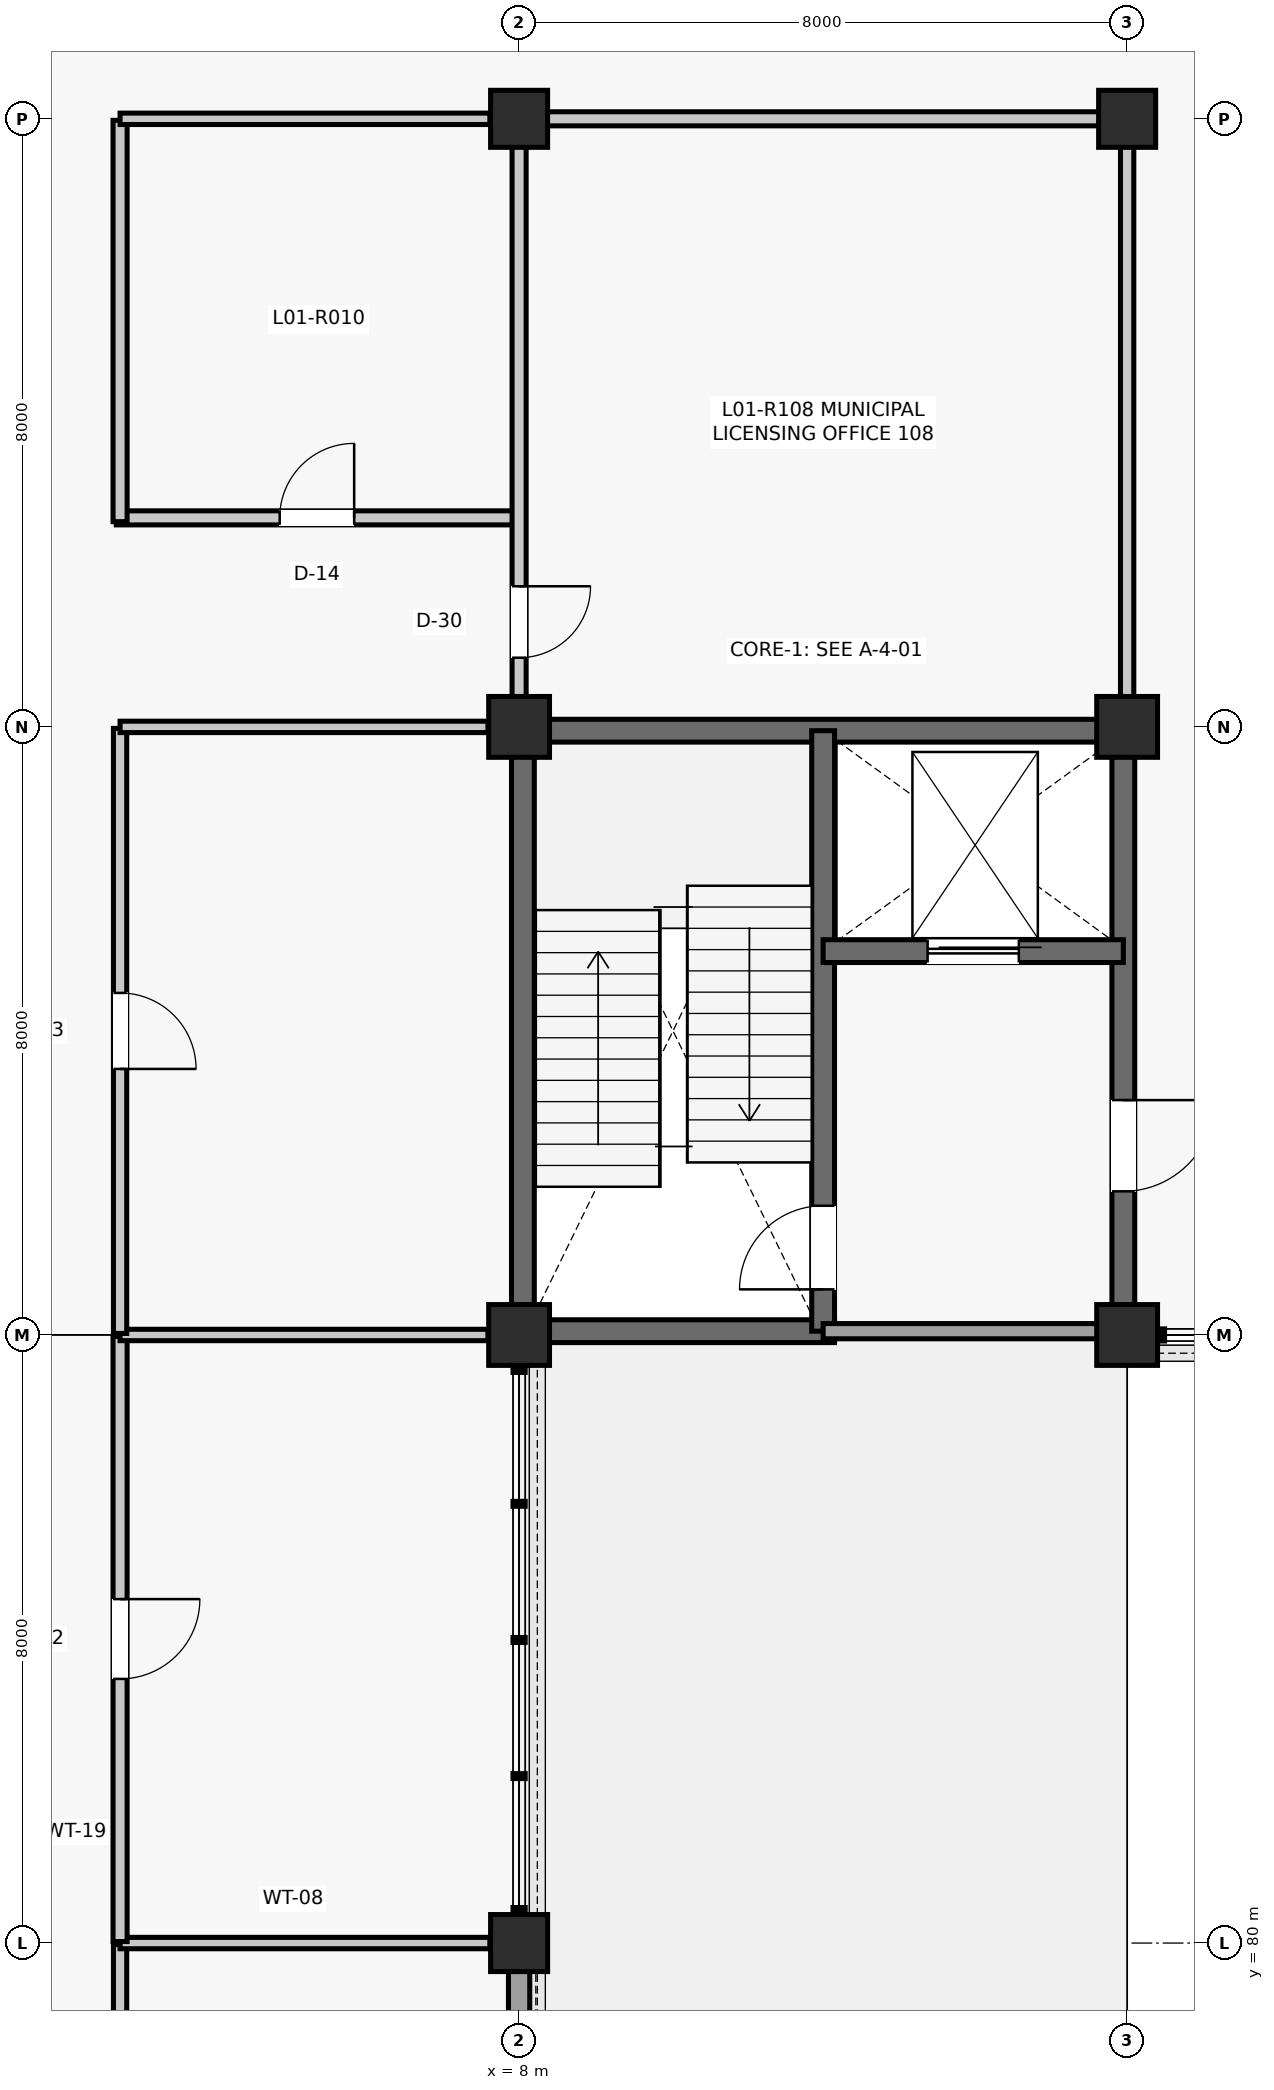
"""IFC4 building model, lengths in metres.
Left out: names, types, materials, properties, quantities, classifications, styles, units other than length and angle.
Written with IfcOpenShell. Run it as: python <this file> out.ifc"""

import sys

from ifc_helpers import new_model, si_unit, direction, frame, frame_2d, origin, origin_2d, place, context, subcontext, project, spatial, rectangle, extrude, element, fill, save


model = new_model("IFC4")
c1 = context("Model", 3, precision=1e-05, world=origin(), true_north=direction((0.0, 1.0)))
c2 = subcontext(c1, "Body", "Model", "MODEL_VIEW")
j1 = project(units=[si_unit("LENGTHUNIT", "METRE"), si_unit("PLANEANGLEUNIT", "RADIAN")], contexts=[c1])
p1 = place(None, origin())
s1 = spatial("IfcSite", under=j1, at=p1, CompositionType="ELEMENT")
p2 = place(p1, origin())
s2 = spatial("IfcBuilding", under=s1, at=p2, CompositionType="ELEMENT")
p3 = place(p2, frame((0.0, 0.0, 5.28)))
s3 = spatial("IfcBuildingStorey", under=s2, at=p3, CompositionType="ELEMENT", Elevation=5.28)
p4 = place(p3, frame((8.0, 80.0, 0.0), z_axis=(0.0, 0.0, 1.0), x_axis=(1.0, 0.0, 0.0)))
e1 = element("IfcColumn", 1, at=p4, inside=s3, PredefinedType="COLUMN", context=c2, shape_type="SweptSolid", body=[
    extrude(rectangle(XDim=0.75, YDim=0.75, at=origin_2d()), origin(), (0.0, 0.0, 1.0), 4.62),
])
for number, where, z_axis, x_axis in (
    (2, (8.0, 88.0, 0.0), (0.0, 0.0, 1.0), (1.0, 0.0, 0.0)),
    (3, (8.0, 96.0, 0.0), (0.0, 0.0, 1.0), (1.0, 0.0, 0.0)),
):
    element("IfcColumn", number, at=place(p3, frame(where, z_axis=z_axis, x_axis=x_axis)), inside=s3, PredefinedType="COLUMN", context=c2, shape_type="SweptSolid", body=[
        extrude(rectangle(XDim=0.8, YDim=0.8, at=origin_2d()), origin(), (0.0, 0.0, 1.0), 4.62),
    ])
p5 = place(p3, frame((8.0, 104.0, 0.0), z_axis=(0.0, 0.0, 1.0), x_axis=(1.0, 0.0, 0.0)))
e4 = element("IfcColumn", 4, at=p5, inside=s3, PredefinedType="COLUMN", context=c2, shape_type="SweptSolid", body=[
    extrude(rectangle(XDim=0.75, YDim=0.75, at=origin_2d()), origin(), (0.0, 0.0, 1.0), 4.62),
])
for number, where, z_axis, x_axis in (
    (5, (16.0, 88.0, 0.0), (0.0, 0.0, 1.0), (1.0, 0.0, 0.0)),
    (6, (16.0, 96.0, 0.0), (0.0, 0.0, 1.0), (1.0, 0.0, 0.0)),
):
    element("IfcColumn", number, at=place(p3, frame(where, z_axis=z_axis, x_axis=x_axis)), inside=s3, PredefinedType="COLUMN", context=c2, shape_type="SweptSolid", body=[
        extrude(rectangle(XDim=0.8, YDim=0.8, at=origin_2d()), origin(), (0.0, 0.0, 1.0), 4.62),
    ])
p6 = place(p3, frame((16.0, 104.0, 0.0), z_axis=(0.0, 0.0, 1.0), x_axis=(1.0, 0.0, 0.0)))
e7 = element("IfcColumn", 7, at=p6, inside=s3, PredefinedType="COLUMN", context=c2, shape_type="SweptSolid", body=[
    extrude(rectangle(XDim=0.75, YDim=0.75, at=origin_2d()), origin(), (0.0, 0.0, 1.0), 4.62),
])
p7 = place(p3, frame((8.0, 72.285, 0.0), z_axis=(0.0, 0.0, 1.0), x_axis=(0.0, 1.0, 0.0)))
e8 = element("IfcWall", 8, at=p7, inside=s3, PredefinedType="SOLIDWALL", context=c2, shape_type="SweptSolid", body=[
    extrude(rectangle(XDim=7.355, YDim=0.28, at=frame_2d((3.677, 0.0))), origin(), (0.0, 0.0, 1.0), 3.977),
])
p8 = place(p7, frame((2.627, 0.0, 0.9)))
e9 = element("IfcOpeningElement", 9, at=p8, cuts=e8, PredefinedType="OPENING", context=c2, shape_type="SweptSolid", body=[
    extrude(rectangle(XDim=2.1, YDim=2.4, at=frame_2d((1.05, 1.2))), frame((0.0, 0.15, 0.0), z_axis=(0.0, -1.0, 0.0), x_axis=(1.0, 0.0, 0.0)), (0.0, 0.0, 1.0), 0.3),
])
for number, where, z_axis, x_axis in (
    (10, (8.05, 88.29, 0.0), (0.0, 0.0, 1.0), (0.0, 1.0, 0.0)),
    (11, (8.29, 95.95, 0.0), (0.0, 0.0, 1.0), (1.0, 0.0, 0.0)),
):
    element("IfcWall", number, at=place(p3, frame(where, z_axis=z_axis, x_axis=x_axis)), inside=s3, PredefinedType="SHEAR", context=c2, shape_type="SweptSolid", body=[
        extrude(rectangle(XDim=7.42, YDim=0.3, at=frame_2d((3.71, 0.0))), origin(), (0.0, 0.0, 1.0), 4.335),
    ])
p9 = place(p3, frame((15.95, 88.29, 0.0), z_axis=(0.0, 0.0, 1.0), x_axis=(0.0, 1.0, 0.0)))
e12 = element("IfcWall", 12, at=p9, inside=s3, PredefinedType="SHEAR", context=c2, shape_type="SweptSolid", body=[
    extrude(rectangle(XDim=7.42, YDim=0.3, at=frame_2d((3.71, 0.0))), origin(), (0.0, 0.0, 1.0), 4.335),
])
p10 = place(p9, frame((1.6, 0.0, 0.0)))
e13 = element("IfcOpeningElement", 13, at=p10, cuts=e12, PredefinedType="OPENING", context=c2, shape_type="SweptSolid", body=[
    extrude(rectangle(XDim=1.2, YDim=2.15, at=frame_2d((0.6, 1.075))), frame((0.0, 0.16, 0.0), z_axis=(0.0, -1.0, 0.0), x_axis=(1.0, 0.0, 0.0)), (0.0, 0.0, 1.0), 0.32),
])
p11 = place(p3, frame((8.29, 88.05, 0.0), z_axis=(0.0, 0.0, 1.0), x_axis=(1.0, 0.0, 0.0)))
e14 = element("IfcWall", 14, at=p11, inside=s3, PredefinedType="SHEAR", context=c2, shape_type="SweptSolid", body=[
    extrude(rectangle(XDim=3.86, YDim=0.3, at=frame_2d((1.93, 0.0))), origin(), (0.0, 0.0, 1.0), 4.335),
])
p12 = place(p3, frame((12.0, 88.05, 0.0), z_axis=(0.0, 0.0, 1.0), x_axis=(0.0, 1.0, 0.0)))
e15 = element("IfcWall", 15, at=p12, inside=s3, PredefinedType="SHEAR", context=c2, shape_type="SweptSolid", body=[
    extrude(rectangle(XDim=7.9, YDim=0.3, at=frame_2d((3.95, 0.0))), origin(), (0.0, 0.0, 1.0), 4.335),
])
p13 = place(p12, frame((0.55, 0.0, 0.0)))
e16 = element("IfcOpeningElement", 16, at=p13, cuts=e15, PredefinedType="OPENING", context=c2, shape_type="SweptSolid", body=[
    extrude(rectangle(XDim=1.1, YDim=2.15, at=frame_2d((0.55, 1.075))), frame((0.0, 0.16, 0.0), z_axis=(0.0, -1.0, 0.0), x_axis=(1.0, 0.0, 0.0)), (0.0, 0.0, 1.0), 0.32),
])
p14 = place(p3, frame((12.0, 93.05, 0.0), z_axis=(0.0, 0.0, 1.0), x_axis=(1.0, 0.0, 0.0)))
e17 = element("IfcWall", 17, at=p14, inside=s3, PredefinedType="SHEAR", context=c2, shape_type="SweptSolid", body=[
    extrude(rectangle(XDim=3.95, YDim=0.3, at=frame_2d((1.975, 0.0))), origin(), (0.0, 0.0, 1.0), 4.335),
])
p15 = place(p14, frame((1.375, 0.0, 0.0)))
e18 = element("IfcOpeningElement", 18, at=p15, cuts=e17, PredefinedType="OPENING", context=c2, shape_type="SweptSolid", body=[
    extrude(rectangle(XDim=1.2, YDim=2.2, at=frame_2d((0.6, 1.1))), frame((0.0, 0.16, 0.0), z_axis=(0.0, -1.0, 0.0), x_axis=(1.0, 0.0, 0.0)), (0.0, 0.0, 1.0), 0.32),
])
p16 = place(p3, frame((12.0, 88.05, 0.0), z_axis=(0.0, 0.0, 1.0), x_axis=(1.0, 0.0, 0.0)))
e19 = element("IfcWall", 19, at=p16, inside=s3, PredefinedType="PARTITIONING", context=c2, shape_type="SweptSolid", body=[
    extrude(rectangle(XDim=3.61, YDim=0.2, at=frame_2d((1.805, 0.0))), origin(), (0.0, 0.0, 1.0), 3.967),
])
p17 = place(p3, frame((2.75, 72.02, 0.0), z_axis=(0.0, 0.0, 1.0), x_axis=(0.0, 1.0, 0.0)))
e20 = element("IfcWall", 20, at=p17, inside=s3, PredefinedType="PARTITIONING", context=c2, shape_type="SweptSolid", body=[
    extrude(rectangle(XDim=7.96, YDim=0.175, at=frame_2d((3.98, 0.0))), origin(), (0.0, 0.0, 1.0), 3.771),
])
p18 = place(p17, frame((3.51, 0.0, 0.0)))
e21 = element("IfcOpeningElement", 21, at=p18, cuts=e20, PredefinedType="OPENING", context=c2, shape_type="SweptSolid", body=[
    extrude(rectangle(XDim=0.94, YDim=2.12, at=frame_2d((0.47, 1.06))), frame((0.0, 0.097, 0.0), z_axis=(0.0, -1.0, 0.0), x_axis=(1.0, 0.0, 0.0)), (0.0, 0.0, 1.0), 0.195),
])
p19 = place(p3, frame((2.75, 80.0, 0.0), z_axis=(0.0, 0.0, 1.0), x_axis=(1.0, 0.0, 0.0)))
e22 = element("IfcWall", 22, at=p19, inside=s3, PredefinedType="PARTITIONING", context=c2, shape_type="SweptSolid", body=[
    extrude(rectangle(XDim=4.865, YDim=0.15, at=frame_2d((2.433, 0.0))), origin(), (0.0, 0.0, 1.0), 3.771),
])
p20 = place(p3, frame((2.75, 80.02, 0.0), z_axis=(0.0, 0.0, 1.0), x_axis=(0.0, 1.0, 0.0)))
e23 = element("IfcWall", 23, at=p20, inside=s3, PredefinedType="PARTITIONING", context=c2, shape_type="SweptSolid", body=[
    extrude(rectangle(XDim=7.96, YDim=0.185, at=frame_2d((3.98, 0.0))), origin(), (0.0, 0.0, 1.0), 3.771),
])
p21 = place(p20, frame((3.455, 0.0, 0.0)))
e24 = element("IfcOpeningElement", 24, at=p21, cuts=e23, PredefinedType="OPENING", context=c2, shape_type="SweptSolid", body=[
    extrude(rectangle(XDim=1.05, YDim=2.15, at=frame_2d((0.525, 1.075))), frame((0.0, 0.103, 0.0), z_axis=(0.0, -1.0, 0.0), x_axis=(1.0, 0.0, 0.0)), (0.0, 0.0, 1.0), 0.205),
])
p22 = place(p3, frame((2.75, 88.0, 0.0), z_axis=(0.0, 0.0, 1.0), x_axis=(1.0, 0.0, 0.0)))
e25 = element("IfcWall", 25, at=p22, inside=s3, PredefinedType="PARTITIONING", context=c2, shape_type="SweptSolid", body=[
    extrude(rectangle(XDim=4.84, YDim=0.15, at=frame_2d((2.42, 0.0))), origin(), (0.0, 0.0, 1.0), 3.781),
])
p23 = place(p3, frame((2.75, 88.02, 0.0), z_axis=(0.0, 0.0, 1.0), x_axis=(0.0, 1.0, 0.0)))
e26 = element("IfcWall", 26, at=p23, inside=s3, PredefinedType="PARTITIONING", context=c2, shape_type="SweptSolid", body=[
    extrude(rectangle(XDim=7.96, YDim=0.175, at=frame_2d((3.98, 0.0))), origin(), (0.0, 0.0, 1.0), 3.712),
])
p24 = place(p23, frame((3.48, 0.0, 0.0)))
e27 = element("IfcOpeningElement", 27, at=p24, cuts=e26, PredefinedType="OPENING", context=c2, shape_type="SweptSolid", body=[
    extrude(rectangle(XDim=1.0, YDim=2.15, at=frame_2d((0.5, 1.075))), frame((0.0, 0.097, 0.0), z_axis=(0.0, -1.0, 0.0), x_axis=(1.0, 0.0, 0.0)), (0.0, 0.0, 1.0), 0.195),
])
p25 = place(p3, frame((2.75, 96.0, 0.0), z_axis=(0.0, 0.0, 1.0), x_axis=(1.0, 0.0, 0.0)))
e28 = element("IfcWall", 28, at=p25, inside=s3, PredefinedType="PARTITIONING", context=c2, shape_type="SweptSolid", body=[
    extrude(rectangle(XDim=4.84, YDim=0.15, at=frame_2d((2.42, 0.0))), origin(), (0.0, 0.0, 1.0), 3.712),
])
p26 = place(p3, frame((2.7, 98.75, 0.0), z_axis=(0.0, 0.0, 1.0), x_axis=(1.0, 0.0, 0.0)))
e29 = element("IfcWall", 29, at=p26, inside=s3, PredefinedType="PARTITIONING", context=c2, shape_type="SweptSolid", body=[
    extrude(rectangle(XDim=5.28, YDim=0.185, at=frame_2d((2.64, 0.0))), origin(), (0.0, 0.0, 1.0), 3.857),
])
p27 = place(p26, frame((2.15, 0.0, 0.0)))
e30 = element("IfcOpeningElement", 30, at=p27, cuts=e29, PredefinedType="OPENING", context=c2, shape_type="SweptSolid", body=[
    extrude(rectangle(XDim=0.98, YDim=2.15, at=frame_2d((0.49, 1.075))), frame((0.0, 0.103, 0.0), z_axis=(0.0, -1.0, 0.0), x_axis=(1.0, 0.0, 0.0)), (0.0, 0.0, 1.0), 0.205),
])
p28 = place(p3, frame((2.75, 98.7, 0.0), z_axis=(0.0, 0.0, 1.0), x_axis=(0.0, 1.0, 0.0)))
e31 = element("IfcWall", 31, at=p28, inside=s3, PredefinedType="PARTITIONING", context=c2, shape_type="SweptSolid", body=[
    extrude(rectangle(XDim=5.28, YDim=0.185, at=frame_2d((2.64, 0.0))), origin(), (0.0, 0.0, 1.0), 3.787),
])
p29 = place(p3, frame((2.75, 104.0, 0.0), z_axis=(0.0, 0.0, 1.0), x_axis=(1.0, 0.0, 0.0)))
e32 = element("IfcWall", 32, at=p29, inside=s3, PredefinedType="PARTITIONING", context=c2, shape_type="SweptSolid", body=[
    extrude(rectangle(XDim=4.865, YDim=0.15, at=frame_2d((2.433, 0.0))), origin(), (0.0, 0.0, 1.0), 3.787),
])
p30 = place(p3, frame((8.0, 96.39, 0.0), z_axis=(0.0, 0.0, 1.0), x_axis=(0.0, 1.0, 0.0)))
e33 = element("IfcWall", 33, at=p30, inside=s3, PredefinedType="PARTITIONING", context=c2, shape_type="SweptSolid", body=[
    extrude(rectangle(XDim=7.245, YDim=0.185, at=frame_2d((3.623, 0.0))), origin(), (0.0, 0.0, 1.0), 3.857),
])
p31 = place(p30, frame((0.52, 0.0, 0.0)))
e34 = element("IfcOpeningElement", 34, at=p31, cuts=e33, PredefinedType="OPENING", context=c2, shape_type="SweptSolid", body=[
    extrude(rectangle(XDim=0.94, YDim=2.12, at=frame_2d((0.47, 1.06))), frame((0.0, 0.103, 0.0), z_axis=(0.0, -1.0, 0.0), x_axis=(1.0, 0.0, 0.0)), (0.0, 0.0, 1.0), 0.205),
])
p32 = place(p3, frame((16.0, 96.39, 0.0), z_axis=(0.0, 0.0, 1.0), x_axis=(0.0, 1.0, 0.0)))
e35 = element("IfcWall", 35, at=p32, inside=s3, PredefinedType="PARTITIONING", context=c2, shape_type="SweptSolid", body=[
    extrude(rectangle(XDim=7.245, YDim=0.175, at=frame_2d((3.623, 0.0))), origin(), (0.0, 0.0, 1.0), 3.781),
])
p33 = place(p3, frame((8.365, 104.0, 0.0), z_axis=(0.0, 0.0, 1.0), x_axis=(1.0, 0.0, 0.0)))
e36 = element("IfcWall", 36, at=p33, inside=s3, PredefinedType="PARTITIONING", context=c2, shape_type="SweptSolid", body=[
    extrude(rectangle(XDim=7.27, YDim=0.185, at=frame_2d((3.635, 0.0))), origin(), (0.0, 0.0, 1.0), 3.771),
])
p34 = place(p13, origin())
e37 = element("IfcDoor", 37, at=p34, inside=s3, OperationType="SINGLE_SWING_LEFT", PredefinedType="DOOR", context=c2, shape_type="SweptSolid", body=[
    extrude(rectangle(XDim=1.1, YDim=2.15, at=frame_2d((0.55, 1.075))), frame((0.0, 0.025, 0.0), z_axis=(0.0, -1.0, 0.0), x_axis=(1.0, 0.0, 0.0)), (0.0, 0.0, 1.0), 0.05),
])
fill(e16, e37)
p35 = place(p15, origin())
e38 = element("IfcDoor", 38, at=p35, inside=s3, OperationType="SLIDING_TO_LEFT", PredefinedType="DOOR", context=c2, shape_type="SweptSolid", body=[
    extrude(rectangle(XDim=1.2, YDim=2.2, at=frame_2d((0.6, 1.1))), frame((0.0, 0.025, 0.0), z_axis=(0.0, -1.0, 0.0), x_axis=(1.0, 0.0, 0.0)), (0.0, 0.0, 1.0), 0.05),
])
fill(e18, e38)
p36 = place(p10, frame((1.2, 0.0, 0.0), z_axis=(0.0, 0.0, 1.0), x_axis=(-1.0, 0.0, 0.0)))
e39 = element("IfcDoor", 39, at=p36, inside=s3, OperationType="SINGLE_SWING_RIGHT", PredefinedType="DOOR", context=c2, shape_type="SweptSolid", body=[
    extrude(rectangle(XDim=1.2, YDim=2.15, at=frame_2d((0.6, 1.075))), frame((0.0, 0.025, 0.0), z_axis=(0.0, -1.0, 0.0), x_axis=(1.0, 0.0, 0.0)), (0.0, 0.0, 1.0), 0.05),
])
fill(e13, e39)
p37 = place(p21, frame((1.05, 0.0, 0.0), z_axis=(0.0, 0.0, 1.0), x_axis=(-1.0, 0.0, 0.0)))
e40 = element("IfcDoor", 40, at=p37, inside=s3, OperationType="SINGLE_SWING_RIGHT", PredefinedType="DOOR", context=c2, shape_type="SweptSolid", body=[
    extrude(rectangle(XDim=1.05, YDim=2.15, at=frame_2d((0.525, 1.075))), frame((0.0, 0.025, 0.0), z_axis=(0.0, -1.0, 0.0), x_axis=(1.0, 0.0, 0.0)), (0.0, 0.0, 1.0), 0.05),
])
fill(e24, e40)
p38 = place(p24, frame((1.0, 0.0, 0.0), z_axis=(0.0, 0.0, 1.0), x_axis=(-1.0, 0.0, 0.0)))
e41 = element("IfcDoor", 41, at=p38, inside=s3, OperationType="SINGLE_SWING_LEFT", PredefinedType="DOOR", context=c2, shape_type="SweptSolid", body=[
    extrude(rectangle(XDim=1.0, YDim=2.15, at=frame_2d((0.5, 1.075))), frame((0.0, 0.025, 0.0), z_axis=(0.0, -1.0, 0.0), x_axis=(1.0, 0.0, 0.0)), (0.0, 0.0, 1.0), 0.05),
])
fill(e27, e41)
p39 = place(p27, origin())
e42 = element("IfcDoor", 42, at=p39, inside=s3, OperationType="SINGLE_SWING_RIGHT", PredefinedType="DOOR", context=c2, shape_type="SweptSolid", body=[
    extrude(rectangle(XDim=0.98, YDim=2.15, at=frame_2d((0.49, 1.075))), frame((0.0, 0.025, 0.0), z_axis=(0.0, -1.0, 0.0), x_axis=(1.0, 0.0, 0.0)), (0.0, 0.0, 1.0), 0.05),
])
fill(e30, e42)
p40 = place(p31, frame((0.94, 0.0, 0.0), z_axis=(0.0, 0.0, 1.0), x_axis=(-1.0, 0.0, 0.0)))
e43 = element("IfcDoor", 43, at=p40, inside=s3, OperationType="SINGLE_SWING_RIGHT", PredefinedType="DOOR", context=c2, shape_type="SweptSolid", body=[
    extrude(rectangle(XDim=0.94, YDim=2.12, at=frame_2d((0.47, 1.06))), frame((0.0, 0.025, 0.0), z_axis=(0.0, -1.0, 0.0), x_axis=(1.0, 0.0, 0.0)), (0.0, 0.0, 1.0), 0.05),
])
fill(e34, e43)
save(model, sys.argv[1])
